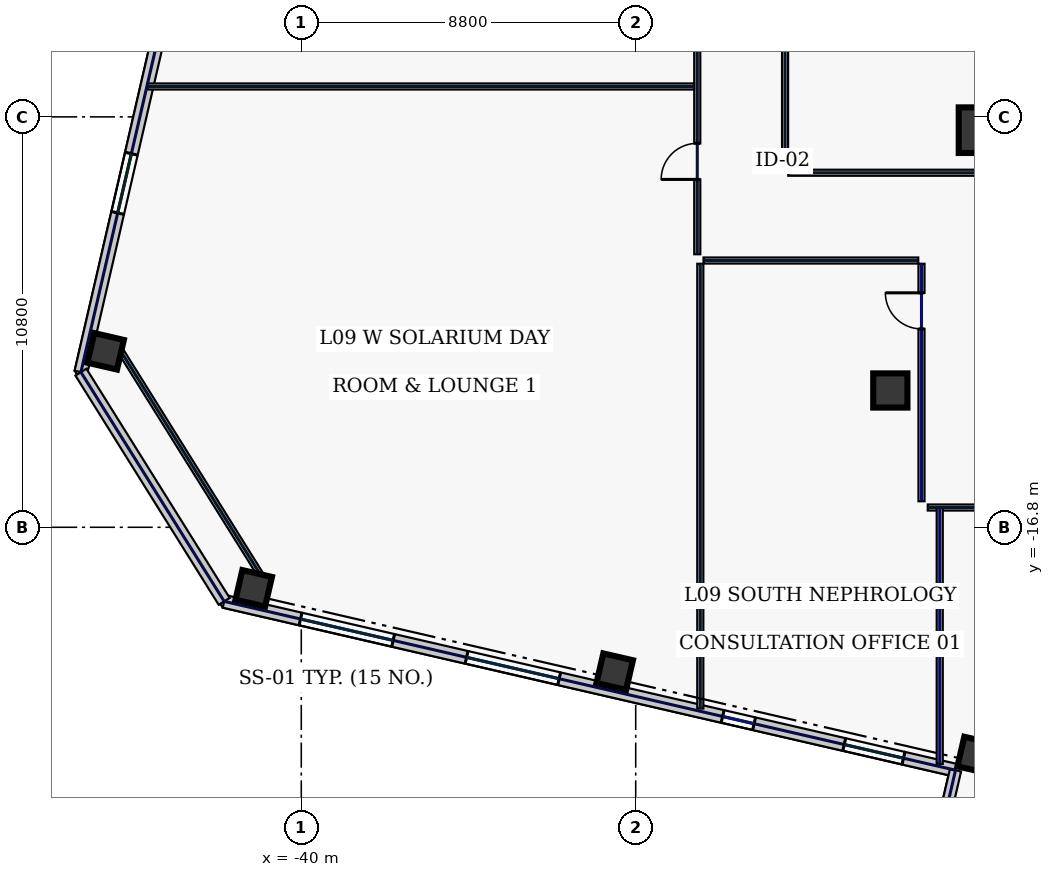
"""IFC4 building model, lengths in metres.
Left out: names, types, materials, properties, quantities, classifications, styles, units other than length and angle.
Written with IfcOpenShell. Run it as: python <this file> out.ifc"""

import sys

from ifc_helpers import new_model, si_unit, direction, frame, frame_2d, origin, origin_2d, place, context, subcontext, project, spatial, rectangle, hollow_rectangle, extrude, element, fill, save


model = new_model("IFC4")
c1 = context("Model", 3, precision=1e-05, world=origin(), true_north=direction((0.0, 1.0)))
c2 = subcontext(c1, "Body", "Model", "MODEL_VIEW")
j1 = project(units=[si_unit("LENGTHUNIT", "METRE"), si_unit("PLANEANGLEUNIT", "RADIAN")], contexts=[c1])
p1 = place(None, origin())
s1 = spatial("IfcSite", under=j1, at=p1, CompositionType="ELEMENT")
p2 = place(p1, origin())
s2 = spatial("IfcBuilding", under=s1, at=p2, CompositionType="ELEMENT")
p3 = place(p2, frame((0.0, 0.0, 47.4)))
s3 = spatial("IfcBuildingStorey", under=s2, at=p3, CompositionType="ELEMENT", Elevation=47.4)
p4 = place(p3, frame((-22.1, -6.35, 0.0), z_axis=(0.0, 0.0, 1.0), x_axis=(1.0, 0.0, 0.0)))
e1 = element("IfcColumn", 1, at=p4, inside=s3, PredefinedType="COLUMN", context=c2, shape_type="SweptSolid", body=[
    extrude(hollow_rectangle(XDim=1.2, YDim=1.2, WallThickness=0.05, at=origin_2d()), origin(), (0.0, 0.0, 1.0), 3.74),
])
p5 = place(p3, frame((-24.5, -13.2, 0.0), z_axis=(0.0, 0.0, 1.0), x_axis=(1.0, 0.0, 0.0)))
e2 = element("IfcColumn", 2, at=p5, inside=s3, PredefinedType="COLUMN", context=c2, shape_type="SweptSolid", body=[
    extrude(hollow_rectangle(XDim=0.9, YDim=0.9, WallThickness=0.04, at=origin_2d()), origin(), (0.0, 0.0, 1.0), 3.74),
])
for number, where, z_axis, x_axis in (
    (3, (-41.251, -18.406, 0.0), (0.0, 0.0, 1.0), (0.974, -0.225, 0.0)),
    (4, (-31.752, -20.599, 0.0), (0.0, 0.0, 1.0), (0.974, -0.225, 0.0)),
    (5, (-22.254, -22.792, 0.0), (0.0, 0.0, 1.0), (0.974, -0.225, 0.0)),
    (6, (-45.148, -12.169, 0.0), (0.0, 0.0, 1.0), (0.974, -0.225, 0.0)),
):
    element("IfcColumn", number, at=place(p3, frame(where, z_axis=z_axis, x_axis=x_axis)), inside=s3, PredefinedType="COLUMN", context=c2, shape_type="SweptSolid", body=[
        extrude(hollow_rectangle(XDim=0.8, YDim=0.8, WallThickness=0.036, at=origin_2d()), origin(), (0.0, 0.0, 1.0), 3.74),
    ])
p6 = place(p3, frame((-42.029, -18.75, 0.0), z_axis=(0.0, 0.0, 1.0), x_axis=(0.974371399361, -0.224945273581, 0.0)))
e7 = element("IfcWall", 7, at=p6, inside=s3, PredefinedType="STANDARD", context=c2, shape_type="SweptSolid", body=[
    extrude(rectangle(XDim=19.75, YDim=0.34, at=frame_2d((9.875, 0.0))), origin(), (0.0, 0.0, 1.0), 3.74),
])
p7 = place(p6, frame((2.062, 0.0, 0.72)))
e8 = element("IfcOpeningElement", 8, at=p7, cuts=e7, PredefinedType="OPENING", context=c2, shape_type="SweptSolid", body=[
    extrude(rectangle(XDim=2.5, YDim=2.15, at=frame_2d((1.25, 1.075))), frame((0.0, 0.18, 0.0), z_axis=(0.0, -1.0, 0.0), x_axis=(1.0, 0.0, 0.0)), (0.0, 0.0, 1.0), 0.36),
])
p8 = place(p6, frame((6.546, 0.0, 0.72)))
e9 = element("IfcOpeningElement", 9, at=p8, cuts=e7, PredefinedType="OPENING", context=c2, shape_type="SweptSolid", body=[
    extrude(rectangle(XDim=2.5, YDim=2.15, at=frame_2d((1.25, 1.075))), frame((0.0, 0.18, 0.0), z_axis=(0.0, -1.0, 0.0), x_axis=(1.0, 0.0, 0.0)), (0.0, 0.0, 1.0), 0.36),
])
p9 = place(p6, frame((13.461, 0.0, 0.72)))
e10 = element("IfcOpeningElement", 10, at=p9, cuts=e7, PredefinedType="OPENING", context=c2, shape_type="SweptSolid", body=[
    extrude(rectangle(XDim=0.85, YDim=1.85, at=frame_2d((0.425, 0.925))), frame((0.0, 0.18, 0.0), z_axis=(0.0, -1.0, 0.0), x_axis=(1.0, 0.0, 0.0)), (0.0, 0.0, 1.0), 0.36),
])
p10 = place(p6, frame((16.745, 0.0, 0.22)))
e11 = element("IfcOpeningElement", 11, at=p10, cuts=e7, PredefinedType="OPENING", context=c2, shape_type="SweptSolid", body=[
    extrude(rectangle(XDim=1.6, YDim=1.2, at=frame_2d((0.8, 0.6))), frame((0.0, 0.18, 0.0), z_axis=(0.0, -1.0, 0.0), x_axis=(1.0, 0.0, 0.0)), (0.0, 0.0, 1.0), 0.36),
])
p11 = place(p3, frame((-36.62, 27.037, 0.0), z_axis=(0.0, 0.0, 1.0), x_axis=(-0.224951280646, -0.974370012539, 0.0)))
e12 = element("IfcWall", 12, at=p11, inside=s3, PredefinedType="STANDARD", context=c2, shape_type="SweptSolid", body=[
    extrude(rectangle(XDim=40.8, YDim=0.34, at=frame_2d((20.4, 0.0))), origin(), (0.0, 0.0, 1.0), 3.74),
])
p12 = place(p11, frame((4.3, 0.0, 0.58)))
e13 = element("IfcOpeningElement", 13, at=p12, cuts=e12, PredefinedType="OPENING", context=c2, shape_type="SweptSolid", body=[
    extrude(rectangle(XDim=1.6, YDim=2.3, at=frame_2d((0.8, 1.15))), frame((0.0, 0.18, 0.0), z_axis=(0.0, -1.0, 0.0), x_axis=(1.0, 0.0, 0.0)), (0.0, 0.0, 1.0), 0.36),
])
p13 = place(p11, frame((14.5, 0.0, 0.58)))
e14 = element("IfcOpeningElement", 14, at=p13, cuts=e12, PredefinedType="OPENING", context=c2, shape_type="SweptSolid", body=[
    extrude(rectangle(XDim=1.6, YDim=2.3, at=frame_2d((0.8, 1.15))), frame((0.0, 0.18, 0.0), z_axis=(0.0, -1.0, 0.0), x_axis=(1.0, 0.0, 0.0)), (0.0, 0.0, 1.0), 0.36),
])
p14 = place(p11, frame((24.35, 0.0, 0.75)))
e15 = element("IfcOpeningElement", 15, at=p14, cuts=e12, PredefinedType="OPENING", context=c2, shape_type="SweptSolid", body=[
    extrude(rectangle(XDim=0.85, YDim=1.85, at=frame_2d((0.425, 0.925))), frame((0.0, 0.18, 0.0), z_axis=(0.0, -1.0, 0.0), x_axis=(1.0, 0.0, 0.0)), (0.0, 0.0, 1.0), 0.36),
])
p15 = place(p11, frame((34.9, 0.0, 0.58)))
e16 = element("IfcOpeningElement", 16, at=p15, cuts=e12, PredefinedType="OPENING", context=c2, shape_type="SweptSolid", body=[
    extrude(rectangle(XDim=1.6, YDim=2.3, at=frame_2d((0.8, 1.15))), frame((0.0, 0.18, 0.0), z_axis=(0.0, -1.0, 0.0), x_axis=(1.0, 0.0, 0.0)), (0.0, 0.0, 1.0), 0.36),
])
p16 = place(p3, frame((-45.798, -12.717, 0.0), z_axis=(0.0, 0.0, 1.0), x_axis=(0.529906387556, -0.848056142261, 0.0)))
e17 = element("IfcWall", 17, at=p16, inside=s3, PredefinedType="STANDARD", context=c2, shape_type="SweptSolid", body=[
    extrude(rectangle(XDim=7.114, YDim=0.34, at=frame_2d((3.557, 0.0))), origin(), (0.0, 0.0, 1.0), 3.74),
])
p17 = place(p3, frame((-22.785, -23.193, 0.0), z_axis=(0.0, 0.0, 1.0), x_axis=(-0.224983749842, -0.974362515857, 0.0)))
e18 = element("IfcWall", 18, at=p17, inside=s3, PredefinedType="STANDARD", context=c2, shape_type="SweptSolid", body=[
    extrude(rectangle(XDim=2.87, YDim=0.3, at=frame_2d((1.435, 0.0))), origin(), (0.0, 0.0, 1.0), 1.535),
])
p18 = place(p3, frame((-44.86, -11.989, 0.0), z_axis=(0.0, 0.0, 1.0), x_axis=(0.52991239767, -0.848052386823, 0.0)))
e19 = element("IfcWall", 19, at=p18, inside=s3, PredefinedType="PARTITIONING", context=c2, shape_type="SweptSolid", body=[
    extrude(rectangle(XDim=7.354, YDim=0.16, at=frame_2d((3.677, 0.0))), origin(), (0.0, 0.0, 1.0), 3.74),
])
p19 = place(p3, frame((-23.765, -9.78, 0.0), z_axis=(0.0, 0.0, 1.0), x_axis=(-1.0, 0.0, 0.0)))
e20 = element("IfcWall", 20, at=p19, inside=s3, PredefinedType="PARTITIONING", context=c2, shape_type="SweptSolid", body=[
    extrude(rectangle(XDim=5.65, YDim=0.16, at=frame_2d((2.825, 0.0))), origin(), (0.0, 0.0, 1.0), 3.74),
])
p20 = place(p3, frame((-29.58, -9.615, 0.0), z_axis=(0.0, 0.0, 1.0), x_axis=(0.0, 1.0, 0.0)))
e21 = element("IfcWall", 21, at=p20, inside=s3, PredefinedType="PARTITIONING", context=c2, shape_type="SweptSolid", body=[
    extrude(rectangle(XDim=19.28, YDim=0.16, at=frame_2d((9.64, 0.0))), origin(), (0.0, 0.0, 1.0), 3.74),
])
p21 = place(p20, frame((1.969, 0.0, 0.0)))
e22 = element("IfcOpeningElement", 22, at=p21, cuts=e21, PredefinedType="OPENING", context=c2, shape_type="SweptSolid", body=[
    extrude(rectangle(XDim=0.95, YDim=2.2, at=frame_2d((0.475, 1.1))), frame((0.0, 0.09, 0.0), z_axis=(0.0, -1.0, 0.0), x_axis=(1.0, 0.0, 0.0)), (0.0, 0.0, 1.0), 0.18),
])
p22 = place(p20, frame((7.25, 0.0, 0.0)))
e23 = element("IfcOpeningElement", 23, at=p22, cuts=e21, PredefinedType="OPENING", context=c2, shape_type="SweptSolid", body=[
    extrude(rectangle(XDim=0.95, YDim=2.2, at=frame_2d((0.475, 1.1))), frame((0.0, 0.09, 0.0), z_axis=(0.0, -1.0, 0.0), x_axis=(1.0, 0.0, 0.0)), (0.0, 0.0, 1.0), 0.18),
])
p23 = place(p20, frame((12.45, 0.0, 0.0)))
e24 = element("IfcOpeningElement", 24, at=p23, cuts=e21, PredefinedType="OPENING", context=c2, shape_type="SweptSolid", body=[
    extrude(rectangle(XDim=0.95, YDim=2.2, at=frame_2d((0.475, 1.1))), frame((0.0, 0.09, 0.0), z_axis=(0.0, -1.0, 0.0), x_axis=(1.0, 0.0, 0.0)), (0.0, 0.0, 1.0), 0.18),
])
p24 = place(p20, frame((16.506, 0.0, 0.0)))
e25 = element("IfcOpeningElement", 25, at=p24, cuts=e21, PredefinedType="OPENING", context=c2, shape_type="SweptSolid", body=[
    extrude(rectangle(XDim=0.95, YDim=2.2, at=frame_2d((0.475, 1.1))), frame((0.0, 0.09, 0.0), z_axis=(0.0, -1.0, 0.0), x_axis=(1.0, 0.0, 0.0)), (0.0, 0.0, 1.0), 0.18),
])
p25 = place(p3, frame((-21.485, -16.28, 0.0), z_axis=(0.0, 0.0, 1.0), x_axis=(-1.0, 0.0, 0.0)))
e26 = element("IfcWall", 26, at=p25, inside=s3, PredefinedType="PARTITIONING", context=c2, shape_type="SweptSolid", body=[
    extrude(rectangle(XDim=2.03, YDim=0.16, at=frame_2d((1.015, 0.0))), origin(), (0.0, 0.0, 1.0), 3.74),
])
p26 = place(p3, frame((-23.68, -16.115, 0.0), z_axis=(0.0, 0.0, 1.0), x_axis=(0.0, 1.0, 0.0)))
e27 = element("IfcWall", 27, at=p26, inside=s3, PredefinedType="PARTITIONING", context=c2, shape_type="SweptSolid", body=[
    extrude(rectangle(XDim=6.25, YDim=0.16, at=frame_2d((3.125, 0.0))), origin(), (0.0, 0.0, 1.0), 3.235),
])
p27 = place(p26, frame((4.535, 0.0, 0.0)))
e28 = element("IfcOpeningElement", 28, at=p27, cuts=e27, PredefinedType="OPENING", context=c2, shape_type="SweptSolid", body=[
    extrude(rectangle(XDim=0.95, YDim=2.2, at=frame_2d((0.475, 1.1))), frame((0.0, 0.09, 0.0), z_axis=(0.0, -1.0, 0.0), x_axis=(1.0, 0.0, 0.0)), (0.0, 0.0, 1.0), 0.18),
])
p28 = place(p3, frame((-27.27, 7.435, 0.0), z_axis=(0.0, 0.0, 1.0), x_axis=(0.0, -1.0, 0.0)))
e29 = element("IfcWall", 29, at=p28, inside=s3, PredefinedType="PARTITIONING", context=c2, shape_type="SweptSolid", body=[
    extrude(rectangle(XDim=14.82, YDim=0.16, at=frame_2d((7.41, 0.0))), origin(), (0.0, 0.0, 1.0), 3.74),
])
p29 = place(p3, frame((-27.185, -7.47, 0.0), z_axis=(0.0, 0.0, 1.0), x_axis=(1.0, 0.0, 0.0)))
e30 = element("IfcWall", 30, at=p29, inside=s3, PredefinedType="PARTITIONING", context=c2, shape_type="SweptSolid", body=[
    extrude(rectangle(XDim=16.52, YDim=0.16, at=frame_2d((8.26, 0.0))), origin(), (0.0, 0.0, 1.0), 3.74),
])
p30 = place(p3, frame((-29.5, -21.571, 0.0), z_axis=(0.0, 0.0, 1.0), x_axis=(0.0, 1.0, 0.0)))
e31 = element("IfcWall", 31, at=p30, inside=s3, PredefinedType="PARTITIONING", context=c2, shape_type="SweptSolid", body=[
    extrude(rectangle(XDim=11.706, YDim=0.16, at=frame_2d((5.853, 0.0))), origin(), (0.0, 0.0, 1.0), 3.74),
])
p31 = place(p3, frame((-23.2, -23.025, 0.0), z_axis=(0.0, 0.0, 1.0), x_axis=(0.0, 1.0, 0.0)))
e32 = element("IfcWall", 32, at=p31, inside=s3, PredefinedType="PARTITIONING", context=c2, shape_type="SweptSolid", body=[
    extrude(rectangle(XDim=6.74, YDim=0.16, at=frame_2d((3.37, 0.0))), origin(), (0.0, 0.0, 1.0), 1.535),
])
p32 = place(p3, frame((-44.042, -5.2, 0.0), z_axis=(0.0, 0.0, 1.0), x_axis=(1.0, 0.0, 0.0)))
e33 = element("IfcWall", 33, at=p32, inside=s3, PredefinedType="PARTITIONING", context=c2, shape_type="SweptSolid", body=[
    extrude(rectangle(XDim=14.377, YDim=0.16, at=frame_2d((7.188, 0.0))), origin(), (0.0, 0.0, 1.0), 3.74),
])
p33 = place(p7, origin())
e34 = element("IfcWindow", 34, at=p33, inside=s3, PartitioningType="SINGLE_PANEL", PredefinedType="WINDOW", context=c2, shape_type="SweptSolid", body=[
    extrude(rectangle(XDim=2.5, YDim=2.15, at=frame_2d((1.25, 1.075))), frame((0.0, 0.03, 0.0), z_axis=(0.0, -1.0, 0.0), x_axis=(1.0, 0.0, 0.0)), (0.0, 0.0, 1.0), 0.06),
])
fill(e8, e34)
p34 = place(p8, origin())
e35 = element("IfcWindow", 35, at=p34, inside=s3, PartitioningType="SINGLE_PANEL", PredefinedType="WINDOW", context=c2, shape_type="SweptSolid", body=[
    extrude(rectangle(XDim=2.5, YDim=2.15, at=frame_2d((1.25, 1.075))), frame((0.0, 0.03, 0.0), z_axis=(0.0, -1.0, 0.0), x_axis=(1.0, 0.0, 0.0)), (0.0, 0.0, 1.0), 0.06),
])
fill(e9, e35)
p35 = place(p9, origin())
e36 = element("IfcWindow", 36, at=p35, inside=s3, PartitioningType="SINGLE_PANEL", PredefinedType="WINDOW", context=c2, shape_type="SweptSolid", body=[
    extrude(rectangle(XDim=0.85, YDim=1.85, at=frame_2d((0.425, 0.925))), frame((0.0, 0.03, 0.0), z_axis=(0.0, -1.0, 0.0), x_axis=(1.0, 0.0, 0.0)), (0.0, 0.0, 1.0), 0.06),
])
fill(e10, e36)
p36 = place(p10, origin())
e37 = element("IfcWindow", 37, at=p36, inside=s3, PartitioningType="SINGLE_PANEL", PredefinedType="WINDOW", context=c2, shape_type="SweptSolid", body=[
    extrude(rectangle(XDim=1.6, YDim=1.2, at=frame_2d((0.8, 0.6))), frame((0.0, 0.03, 0.0), z_axis=(0.0, -1.0, 0.0), x_axis=(1.0, 0.0, 0.0)), (0.0, 0.0, 1.0), 0.06),
])
fill(e11, e37)
p37 = place(p15, origin())
e38 = element("IfcWindow", 38, at=p37, inside=s3, PartitioningType="SINGLE_PANEL", PredefinedType="WINDOW", context=c2, shape_type="SweptSolid", body=[
    extrude(rectangle(XDim=1.6, YDim=2.3, at=frame_2d((0.8, 1.15))), frame((0.0, 0.03, 0.0), z_axis=(0.0, -1.0, 0.0), x_axis=(1.0, 0.0, 0.0)), (0.0, 0.0, 1.0), 0.06),
])
fill(e16, e38)
p38 = place(p27, origin())
e39 = element("IfcDoor", 39, at=p38, inside=s3, OperationType="SINGLE_SWING_RIGHT", PredefinedType="DOOR", context=c2, shape_type="SweptSolid", body=[
    extrude(rectangle(XDim=0.95, YDim=2.2, at=frame_2d((0.475, 1.1))), frame((0.0, 0.025, 0.0), z_axis=(0.0, -1.0, 0.0), x_axis=(1.0, 0.0, 0.0)), (0.0, 0.0, 1.0), 0.05),
])
fill(e28, e39)
p39 = place(p21, origin())
e40 = element("IfcDoor", 40, at=p39, inside=s3, OperationType="SINGLE_SWING_LEFT", PredefinedType="DOOR", context=c2, shape_type="SweptSolid", body=[
    extrude(rectangle(XDim=0.95, YDim=2.2, at=frame_2d((0.475, 1.1))), frame((0.0, 0.025, 0.0), z_axis=(0.0, -1.0, 0.0), x_axis=(1.0, 0.0, 0.0)), (0.0, 0.0, 1.0), 0.05),
])
fill(e22, e40)
save(model, sys.argv[1])
